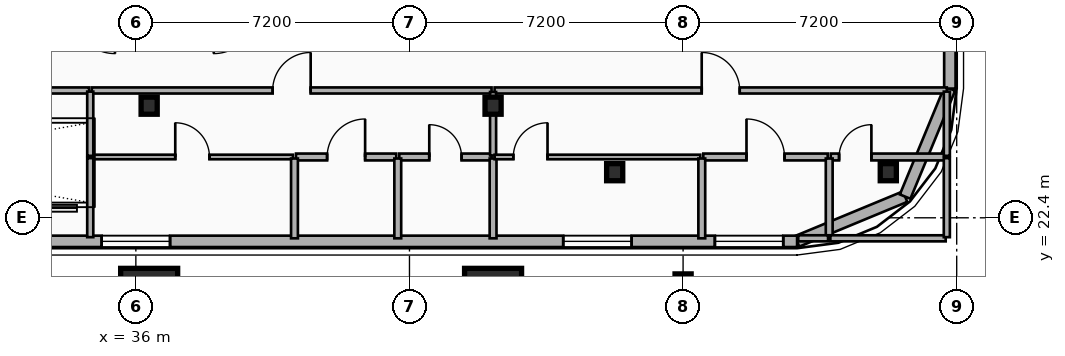
"""IFC4 building model, lengths in metres.
Left out: names, types, materials, properties, quantities, classifications, styles, units other than length and angle.
Written with IfcOpenShell. Run it as: python <this file> out.ifc"""

import sys

from ifc_helpers import new_model, si_unit, direction, frame, frame_2d, origin, origin_2d, place, context, subcontext, project, spatial, rectangle, i_section, extrude, element, fill, save


model = new_model("IFC4")
c1 = context("Model", 3, precision=1e-05, world=origin(), true_north=direction((0.0, 1.0)))
c2 = subcontext(c1, "Body", "Model", "MODEL_VIEW")
j1 = project(units=[si_unit("LENGTHUNIT", "METRE"), si_unit("PLANEANGLEUNIT", "RADIAN")], contexts=[c1])
p1 = place(None, origin())
s1 = spatial("IfcSite", under=j1, at=p1, CompositionType="ELEMENT")
p2 = place(p1, origin())
s2 = spatial("IfcBuilding", under=s1, at=p2, CompositionType="ELEMENT")
p3 = place(p2, frame((0.0, 0.0, 64.0)))
s3 = spatial("IfcBuildingStorey", under=s2, at=p3, CompositionType="ELEMENT", Elevation=64.0)
for number, where, z_axis, x_axis in (
    (1, (36.35, 25.35, 0.0), (0.0, 0.0, 1.0), (1.0, 0.0, 0.0)),
    (2, (45.4, 25.35, 0.0), (0.0, 0.0, 1.0), (1.0, 0.0, 0.0)),
):
    element("IfcColumn", number, at=place(p3, frame(where, z_axis=z_axis, x_axis=x_axis)), inside=s3, PredefinedType="COLUMN", context=c2, shape_type="SweptSolid", body=[
        extrude(i_section(OverallWidth=0.424, OverallDepth=0.45, WebThickness=0.041, FlangeThickness=0.065, FilletRadius=0.015, at=origin_2d()), origin(), (0.0, 0.0, 1.0), 3.5),
    ])
for number, where, z_axis, x_axis in (
    (3, (36.35, 20.428, 0.0), (0.0, -0.09, 0.996), (1.0, 0.0, 0.0)),
    (4, (45.4, 20.428, 0.0), (0.0, -0.09, 0.996), (1.0, 0.0, 0.0)),
):
    element("IfcColumn", number, at=place(p3, frame(where, z_axis=z_axis, x_axis=x_axis)), inside=s3, PredefinedType="COLUMN", context=c2, shape_type="SweptSolid", body=[
        extrude(rectangle(XDim=1.5, YDim=1.5, at=origin_2d()), origin(), (0.0, 0.0, 1.0), 3.514),
    ])
p4 = place(p3, frame((48.6, 23.6, 0.0), z_axis=(0.0, 0.0, 1.0), x_axis=(1.0, 0.0, 0.0)))
e5 = element("IfcColumn", 5, at=p4, inside=s3, PredefinedType="COLUMN", context=c2, shape_type="SweptSolid", body=[
    extrude(i_section(OverallWidth=0.424, OverallDepth=0.45, WebThickness=0.041, FlangeThickness=0.065, FilletRadius=0.015, at=origin_2d()), origin(), (0.0, 0.0, 1.0), 3.5),
])
p5 = place(p3, frame((50.4, 20.795, 0.0), z_axis=(0.0, -0.079891690793, 0.996803550226), x_axis=(1.0, 0.0, 0.0)))
e6 = element("IfcColumn", 6, at=p5, inside=s3, PredefinedType="COLUMN", context=c2, shape_type="SweptSolid", body=[
    extrude(i_section(OverallWidth=0.424, OverallDepth=0.45, WebThickness=0.041, FlangeThickness=0.065, FilletRadius=0.015, at=origin_2d()), origin(), (0.0, 0.0, 1.0), 3.511),
])
p6 = place(p3, frame((55.8, 23.6, 0.0), z_axis=(0.0, 0.0, 1.0), x_axis=(1.0, 0.0, 0.0)))
e7 = element("IfcColumn", 7, at=p6, inside=s3, PredefinedType="COLUMN", context=c2, shape_type="SweptSolid", body=[
    extrude(i_section(OverallWidth=0.424, OverallDepth=0.45, WebThickness=0.041, FlangeThickness=0.065, FilletRadius=0.015, at=origin_2d()), origin(), (0.0, 0.0, 1.0), 3.5),
])
p7 = place(p3, frame((56.243, 22.958, 0.0), z_axis=(0.0, 0.0, 1.0), x_axis=(-0.923882414032, -0.382676475685, 0.0)))
e8 = element("IfcWall", 8, at=p7, inside=s3, PredefinedType="SOLIDWALL", context=c2, shape_type="SweptSolid", body=[
    extrude(rectangle(XDim=3.077, YDim=0.3, at=frame_2d((1.539, 0.0))), origin(), (0.0, 0.0, 1.0), 3.24),
])
p8 = place(p3, frame((57.42, 25.8, 0.0), z_axis=(0.0, 0.0, 1.0), x_axis=(-0.382636798336, -0.92389884758, 0.0)))
e9 = element("IfcWall", 9, at=p8, inside=s3, PredefinedType="SOLIDWALL", context=c2, shape_type="SweptSolid", body=[
    extrude(rectangle(XDim=3.077, YDim=0.3, at=frame_2d((1.538, 0.0))), origin(), (0.0, 0.0, 1.0), 3.24),
])
p9 = place(p3, frame((57.42, 41.0, 0.0), z_axis=(0.0, 0.0, 1.0), x_axis=(0.0, -1.0, 0.0)))
e10 = element("IfcWall", 10, at=p9, inside=s3, PredefinedType="SOLIDWALL", context=c2, shape_type="SweptSolid", body=[
    extrude(rectangle(XDim=15.2, YDim=0.3, at=frame_2d((7.6, 0.0))), origin(), (0.0, 0.0, 1.0), 3.24),
])
p10 = place(p9, frame((8.781, 0.0, 0.48)))
e11 = element("IfcOpeningElement", 11, at=p10, cuts=e10, PredefinedType="OPENING", context=c2, shape_type="SweptSolid", body=[
    extrude(rectangle(XDim=1.4, YDim=1.8, at=frame_2d((0.7, 0.9))), frame((0.0, 0.16, 0.0), z_axis=(0.0, -1.0, 0.0), x_axis=(1.0, 0.0, 0.0)), (0.0, 0.0, 1.0), 0.32),
])
p11 = place(p9, frame((10.94, 0.0, 0.48)))
e12 = element("IfcOpeningElement", 12, at=p11, cuts=e10, PredefinedType="OPENING", context=c2, shape_type="SweptSolid", body=[
    extrude(rectangle(XDim=1.4, YDim=1.8, at=frame_2d((0.7, 0.9))), frame((0.0, 0.16, 0.0), z_axis=(0.0, -1.0, 0.0), x_axis=(1.0, 0.0, 0.0)), (0.0, 0.0, 1.0), 0.32),
])
p12 = place(p9, frame((3.807, 0.0, 0.48)))
e13 = element("IfcOpeningElement", 13, at=p12, cuts=e10, PredefinedType="OPENING", context=c2, shape_type="SweptSolid", body=[
    extrude(rectangle(XDim=1.4, YDim=1.8, at=frame_2d((0.7, 0.9))), frame((0.0, 0.16, 0.0), z_axis=(0.0, -1.0, 0.0), x_axis=(1.0, 0.0, 0.0)), (0.0, 0.0, 1.0), 0.32),
])
p13 = place(p9, frame((5.614, 0.0, 0.48)))
e14 = element("IfcOpeningElement", 14, at=p13, cuts=e10, PredefinedType="OPENING", context=c2, shape_type="SweptSolid", body=[
    extrude(rectangle(XDim=1.4, YDim=1.8, at=frame_2d((0.7, 0.9))), frame((0.0, 0.16, 0.0), z_axis=(0.0, -1.0, 0.0), x_axis=(1.0, 0.0, 0.0)), (0.0, 0.0, 1.0), 0.32),
])
p14 = place(p3, frame((53.4, 21.78, 0.0), z_axis=(0.0, 0.0, 1.0), x_axis=(-1.0, 0.0, 0.0)))
e15 = element("IfcWall", 15, at=p14, inside=s3, PredefinedType="SOLIDWALL", context=c2, shape_type="SweptSolid", body=[
    extrude(rectangle(XDim=49.2, YDim=0.3, at=frame_2d((24.6, 0.0))), origin(), (0.0, 0.0, 1.0), 2.72),
])
p15 = place(p14, frame((45.072, 0.0, 0.48)))
e16 = element("IfcOpeningElement", 16, at=p15, cuts=e15, PredefinedType="OPENING", context=c2, shape_type="SweptSolid", body=[
    extrude(rectangle(XDim=1.8, YDim=1.8, at=frame_2d((0.9, 0.9))), frame((0.0, 0.16, 0.0), z_axis=(0.0, -1.0, 0.0), x_axis=(1.0, 0.0, 0.0)), (0.0, 0.0, 1.0), 0.32),
])
p16 = place(p14, frame((39.5, 0.0, 0.34)))
e17 = element("IfcOpeningElement", 17, at=p16, cuts=e15, PredefinedType="OPENING", context=c2, shape_type="SweptSolid", body=[
    extrude(rectangle(XDim=1.4, YDim=1.8, at=frame_2d((0.7, 0.9))), frame((0.0, 0.16, 0.0), z_axis=(0.0, -1.0, 0.0), x_axis=(1.0, 0.0, 0.0)), (0.0, 0.0, 1.0), 0.32),
])
p17 = place(p14, frame((33.917, 0.0, 1.48)))
e18 = element("IfcOpeningElement", 18, at=p17, cuts=e15, PredefinedType="OPENING", context=c2, shape_type="SweptSolid", body=[
    extrude(rectangle(XDim=1.1, YDim=1.05, at=frame_2d((0.55, 0.525))), frame((0.0, 0.16, 0.0), z_axis=(0.0, -1.0, 0.0), x_axis=(1.0, 0.0, 0.0)), (0.0, 0.0, 1.0), 0.32),
])
p18 = place(p14, frame((16.5, 0.0, 0.34)))
e19 = element("IfcOpeningElement", 19, at=p18, cuts=e15, PredefinedType="OPENING", context=c2, shape_type="SweptSolid", body=[
    extrude(rectangle(XDim=1.8, YDim=1.8, at=frame_2d((0.9, 0.9))), frame((0.0, 0.16, 0.0), z_axis=(0.0, -1.0, 0.0), x_axis=(1.0, 0.0, 0.0)), (0.0, 0.0, 1.0), 0.32),
])
p19 = place(p14, frame((4.354, 0.0, 0.74)))
e20 = element("IfcOpeningElement", 20, at=p19, cuts=e15, PredefinedType="OPENING", context=c2, shape_type="SweptSolid", body=[
    extrude(rectangle(XDim=1.8, YDim=1.8, at=frame_2d((0.9, 0.9))), frame((0.0, 0.16, 0.0), z_axis=(0.0, -1.0, 0.0), x_axis=(1.0, 0.0, 0.0)), (0.0, 0.0, 1.0), 0.32),
])
p20 = place(p14, frame((0.364, 0.0, 0.74)))
e21 = element("IfcOpeningElement", 21, at=p20, cuts=e15, PredefinedType="OPENING", context=c2, shape_type="SweptSolid", body=[
    extrude(rectangle(XDim=1.8, YDim=1.8, at=frame_2d((0.9, 0.9))), frame((0.0, 0.16, 0.0), z_axis=(0.0, -1.0, 0.0), x_axis=(1.0, 0.0, 0.0)), (0.0, 0.0, 1.0), 0.32),
])
p21 = place(p3, frame((34.84, 25.75, 0.0), z_axis=(0.0, 0.0, 1.0), x_axis=(1.0, 0.0, 0.0)))
e22 = element("IfcWall", 22, at=p21, inside=s3, PredefinedType="PARTITIONING", context=c2, shape_type="SweptSolid", body=[
    extrude(rectangle(XDim=10.52, YDim=0.16, at=frame_2d((5.26, 0.0))), origin(), (0.0, 0.0, 1.0), 2.31),
])
p22 = place(p21, frame((4.76, 0.0, 0.0)))
e23 = element("IfcOpeningElement", 23, at=p22, cuts=e22, PredefinedType="OPENING", context=c2, shape_type="SweptSolid", body=[
    extrude(rectangle(XDim=1.0, YDim=2.15, at=frame_2d((0.5, 1.075))), frame((0.0, 0.09, 0.0), z_axis=(0.0, -1.0, 0.0), x_axis=(1.0, 0.0, 0.0)), (0.0, 0.0, 1.0), 0.18),
])
p23 = place(p3, frame((45.44, 25.75, 0.0), z_axis=(0.0, 0.0, 1.0), x_axis=(1.0, 0.0, 0.0)))
e24 = element("IfcWall", 24, at=p23, inside=s3, PredefinedType="PARTITIONING", context=c2, shape_type="SweptSolid", body=[
    extrude(rectangle(XDim=11.9, YDim=0.16, at=frame_2d((5.95, 0.0))), origin(), (0.0, 0.0, 1.0), 2.31),
])
p24 = place(p23, frame((5.45, 0.0, 0.0)))
e25 = element("IfcOpeningElement", 25, at=p24, cuts=e24, PredefinedType="OPENING", context=c2, shape_type="SweptSolid", body=[
    extrude(rectangle(XDim=1.0, YDim=2.15, at=frame_2d((0.5, 1.075))), frame((0.0, 0.09, 0.0), z_axis=(0.0, -1.0, 0.0), x_axis=(1.0, 0.0, 0.0)), (0.0, 0.0, 1.0), 0.18),
])
p25 = place(p3, frame((34.84, 24.0, 0.0), z_axis=(0.0, 0.0, 1.0), x_axis=(1.0, 0.0, 0.0)))
e26 = element("IfcWall", 26, at=p25, inside=s3, PredefinedType="PARTITIONING", context=c2, shape_type="SweptSolid", body=[
    extrude(rectangle(XDim=5.294, YDim=0.12, at=frame_2d((2.647, 0.0))), origin(), (0.0, 0.0, 1.0), 2.31),
])
p26 = place(p25, frame((2.197, 0.0, 0.0)))
e27 = element("IfcOpeningElement", 27, at=p26, cuts=e26, PredefinedType="OPENING", context=c2, shape_type="SweptSolid", body=[
    extrude(rectangle(XDim=0.9, YDim=2.1, at=frame_2d((0.45, 1.05))), frame((0.0, 0.07, 0.0), z_axis=(0.0, -1.0, 0.0), x_axis=(1.0, 0.0, 0.0)), (0.0, 0.0, 1.0), 0.14),
])
p27 = place(p3, frame((40.214, 24.0, 0.0), z_axis=(0.0, 0.0, 1.0), x_axis=(1.0, 0.0, 0.0)))
e28 = element("IfcWall", 28, at=p27, inside=s3, PredefinedType="PLUMBINGWALL", context=c2, shape_type="SweptSolid", body=[
    extrude(rectangle(XDim=2.638, YDim=0.18, at=frame_2d((1.319, 0.0))), origin(), (0.0, 0.0, 1.0), 3.24),
])
p28 = place(p27, frame((0.819, 0.0, 0.0)))
e29 = element("IfcOpeningElement", 29, at=p28, cuts=e28, PredefinedType="OPENING", context=c2, shape_type="SweptSolid", body=[
    extrude(rectangle(XDim=1.0, YDim=2.15, at=frame_2d((0.5, 1.075))), frame((0.0, 0.1, 0.0), z_axis=(0.0, -1.0, 0.0), x_axis=(1.0, 0.0, 0.0)), (0.0, 0.0, 1.0), 0.2),
])
p29 = place(p3, frame((42.932, 24.0, 0.0), z_axis=(0.0, 0.0, 1.0), x_axis=(1.0, 0.0, 0.0)))
e30 = element("IfcWall", 30, at=p29, inside=s3, PredefinedType="PLUMBINGWALL", context=c2, shape_type="SweptSolid", body=[
    extrude(rectangle(XDim=2.428, YDim=0.18, at=frame_2d((1.214, 0.0))), origin(), (0.0, 0.0, 1.0), 2.31),
])
p30 = place(p29, frame((0.789, 0.0, 0.0)))
e31 = element("IfcOpeningElement", 31, at=p30, cuts=e30, PredefinedType="OPENING", context=c2, shape_type="SweptSolid", body=[
    extrude(rectangle(XDim=0.85, YDim=2.1, at=frame_2d((0.425, 1.05))), frame((0.0, 0.1, 0.0), z_axis=(0.0, -1.0, 0.0), x_axis=(1.0, 0.0, 0.0)), (0.0, 0.0, 1.0), 0.2),
])
p31 = place(p3, frame((45.4, 24.04, 0.0), z_axis=(0.0, 0.0, 1.0), x_axis=(0.0, 1.0, 0.0)))
e32 = element("IfcWall", 32, at=p31, inside=s3, PredefinedType="PARTITIONING", context=c2, shape_type="SweptSolid", body=[
    extrude(rectangle(XDim=1.67, YDim=0.16, at=frame_2d((0.835, 0.0))), origin(), (0.0, 0.0, 1.0), 2.31),
])
for number, where, z_axis, x_axis in (
    (33, (40.174, 21.86, 0.0), (0.0, 0.0, 1.0), (0.0, 1.0, 0.0)),
    (34, (42.892, 21.86, 0.0), (0.0, 0.0, 1.0), (0.0, 1.0, 0.0)),
):
    element("IfcWall", number, at=place(p3, frame(where, z_axis=z_axis, x_axis=x_axis)), inside=s3, PredefinedType="PLUMBINGWALL", context=c2, shape_type="SweptSolid", body=[
        extrude(rectangle(XDim=2.1, YDim=0.18, at=frame_2d((1.05, 0.0))), origin(), (0.0, 0.0, 1.0), 2.82),
    ])
p32 = place(p3, frame((45.4, 21.86, 0.0), z_axis=(0.0, 0.0, 1.0), x_axis=(0.0, 1.0, 0.0)))
e35 = element("IfcWall", 35, at=p32, inside=s3, PredefinedType="PLUMBINGWALL", context=c2, shape_type="SweptSolid", body=[
    extrude(rectangle(XDim=2.1, YDim=0.18, at=frame_2d((1.05, 0.0))), origin(), (0.0, 0.0, 1.0), 2.31),
])
p33 = place(p3, frame((45.44, 24.0, 0.0), z_axis=(0.0, 0.0, 1.0), x_axis=(1.0, 0.0, 0.0)))
e36 = element("IfcWall", 36, at=p33, inside=s3, PredefinedType="PARTITIONING", context=c2, shape_type="SweptSolid", body=[
    extrude(rectangle(XDim=5.412, YDim=0.12, at=frame_2d((2.706, 0.0))), origin(), (0.0, 0.0, 1.0), 2.31),
])
p34 = place(p33, frame((0.493, 0.0, 0.0)))
e37 = element("IfcOpeningElement", 37, at=p34, cuts=e36, PredefinedType="OPENING", context=c2, shape_type="SweptSolid", body=[
    extrude(rectangle(XDim=0.9, YDim=2.1, at=frame_2d((0.45, 1.05))), frame((0.0, 0.07, 0.0), z_axis=(0.0, -1.0, 0.0), x_axis=(1.0, 0.0, 0.0)), (0.0, 0.0, 1.0), 0.14),
])
p35 = place(p3, frame((50.932, 24.0, 0.0), z_axis=(0.0, 0.0, 1.0), x_axis=(1.0, 0.0, 0.0)))
e38 = element("IfcWall", 38, at=p35, inside=s3, PredefinedType="PLUMBINGWALL", context=c2, shape_type="SweptSolid", body=[
    extrude(rectangle(XDim=3.273, YDim=0.18, at=frame_2d((1.637, 0.0))), origin(), (0.0, 0.0, 1.0), 2.57),
])
p36 = place(p35, frame((1.136, 0.0, 0.0)))
e39 = element("IfcOpeningElement", 39, at=p36, cuts=e38, PredefinedType="OPENING", context=c2, shape_type="SweptSolid", body=[
    extrude(rectangle(XDim=1.0, YDim=2.15, at=frame_2d((0.5, 1.075))), frame((0.0, 0.1, 0.0), z_axis=(0.0, -1.0, 0.0), x_axis=(1.0, 0.0, 0.0)), (0.0, 0.0, 1.0), 0.2),
])
p37 = place(p3, frame((54.285, 24.0, 0.0), z_axis=(0.0, 0.0, 1.0), x_axis=(1.0, 0.0, 0.0)))
e40 = element("IfcWall", 40, at=p37, inside=s3, PredefinedType="PLUMBINGWALL", context=c2, shape_type="SweptSolid", body=[
    extrude(rectangle(XDim=3.055, YDim=0.18, at=frame_2d((1.528, 0.0))), origin(), (0.0, 0.0, 1.0), 2.57),
])
p38 = place(p37, frame((0.22, 0.0, 0.0)))
e41 = element("IfcOpeningElement", 41, at=p38, cuts=e40, PredefinedType="OPENING", context=c2, shape_type="SweptSolid", body=[
    extrude(rectangle(XDim=0.85, YDim=2.1, at=frame_2d((0.425, 1.05))), frame((0.0, 0.1, 0.0), z_axis=(0.0, -1.0, 0.0), x_axis=(1.0, 0.0, 0.0)), (0.0, 0.0, 1.0), 0.2),
])
p39 = place(p3, frame((50.892, 21.86, 0.0), z_axis=(0.0, 0.0, 1.0), x_axis=(0.0, 1.0, 0.0)))
e42 = element("IfcWall", 42, at=p39, inside=s3, PredefinedType="PLUMBINGWALL", context=c2, shape_type="SweptSolid", body=[
    extrude(rectangle(XDim=2.1, YDim=0.18, at=frame_2d((1.05, 0.0))), origin(), (0.0, 0.0, 1.0), 2.57),
])
p40 = place(p3, frame((54.245, 21.86, 0.0), z_axis=(0.0, 0.0, 1.0), x_axis=(0.0, 1.0, 0.0)))
e43 = element("IfcWall", 43, at=p40, inside=s3, PredefinedType="PLUMBINGWALL", context=c2, shape_type="SweptSolid", body=[
    extrude(rectangle(XDim=2.1, YDim=0.18, at=frame_2d((1.05, 0.0))), origin(), (0.0, 0.0, 1.0), 2.72),
])
p41 = place(p3, frame((22.83, 25.75, 0.0), z_axis=(0.0, 0.0, 1.0), x_axis=(1.0, 0.0, 0.0)))
e44 = element("IfcWall", 44, at=p41, inside=s3, PredefinedType="PARTITIONING", context=c2, shape_type="SweptSolid", body=[
    extrude(rectangle(XDim=11.94, YDim=0.16, at=frame_2d((5.97, 0.0))), origin(), (0.0, 0.0, 1.0), 3.24),
])
p42 = place(p3, frame((34.8, 24.03, 0.0), z_axis=(0.0, 0.0, 1.0), x_axis=(0.0, 1.0, 0.0)))
e45 = element("IfcWall", 45, at=p42, inside=s3, PredefinedType="PARTITIONING", context=c2, shape_type="SweptSolid", body=[
    extrude(rectangle(XDim=1.69, YDim=0.16, at=frame_2d((0.845, 0.0))), origin(), (0.0, 0.0, 1.0), 3.24),
])
p43 = place(p3, frame((34.8, 21.89, 0.0), z_axis=(0.0, 0.0, 1.0), x_axis=(0.0, 1.0, 0.0)))
e46 = element("IfcWall", 46, at=p43, inside=s3, PredefinedType="PARTITIONING", context=c2, shape_type="SweptSolid", body=[
    extrude(rectangle(XDim=2.08, YDim=0.16, at=frame_2d((1.04, 0.0))), origin(), (0.0, 0.0, 1.0), 2.68),
])
p44 = place(p3, frame((57.34, 24.03, 0.0), z_axis=(0.0, 0.0, 1.0), x_axis=(0.0, 1.0, 0.0)))
e47 = element("IfcWall", 47, at=p44, inside=s3, PredefinedType="PARTITIONING", context=c2, shape_type="SweptSolid", body=[
    extrude(rectangle(XDim=1.69, YDim=0.16, at=frame_2d((0.845, 0.0))), origin(), (0.0, 0.0, 1.0), 3.24),
])
p45 = place(p3, frame((53.43, 21.86, 0.0), z_axis=(0.0, 0.0, 1.0), x_axis=(1.0, 0.0, 0.0)))
e48 = element("IfcWall", 48, at=p45, inside=s3, PredefinedType="PARTITIONING", context=c2, shape_type="SweptSolid", body=[
    extrude(rectangle(XDim=0.785, YDim=0.16, at=frame_2d((0.393, 0.0))), origin(), (0.0, 0.0, 1.0), 2.72),
])
p46 = place(p3, frame((54.275, 21.86, 0.0), z_axis=(0.0, 0.0, 1.0), x_axis=(1.0, 0.0, 0.0)))
e49 = element("IfcWall", 49, at=p46, inside=s3, PredefinedType="PARTITIONING", context=c2, shape_type="SweptSolid", body=[
    extrude(rectangle(XDim=3.035, YDim=0.16, at=frame_2d((1.518, 0.0))), origin(), (0.0, 0.0, 1.0), 2.72),
])
p47 = place(p3, frame((57.34, 21.89, 0.0), z_axis=(0.0, 0.0, 1.0), x_axis=(0.0, 1.0, 0.0)))
e50 = element("IfcWall", 50, at=p47, inside=s3, PredefinedType="PARTITIONING", context=c2, shape_type="SweptSolid", body=[
    extrude(rectangle(XDim=2.08, YDim=0.16, at=frame_2d((1.04, 0.0))), origin(), (0.0, 0.0, 1.0), 3.24),
])
p48 = place(p18, origin())
e51 = element("IfcWindow", 51, at=p48, inside=s3, PartitioningType="SINGLE_PANEL", PredefinedType="WINDOW", context=c2, shape_type="SweptSolid", body=[
    extrude(rectangle(XDim=1.8, YDim=1.8, at=frame_2d((0.9, 0.9))), frame((0.0, 0.03, 0.0), z_axis=(0.0, -1.0, 0.0), x_axis=(1.0, 0.0, 0.0)), (0.0, 0.0, 1.0), 0.06),
])
fill(e19, e51)
p49 = place(p19, origin())
e52 = element("IfcWindow", 52, at=p49, inside=s3, PartitioningType="SINGLE_PANEL", PredefinedType="WINDOW", context=c2, shape_type="SweptSolid", body=[
    extrude(rectangle(XDim=1.8, YDim=1.8, at=frame_2d((0.9, 0.9))), frame((0.0, 0.03, 0.0), z_axis=(0.0, -1.0, 0.0), x_axis=(1.0, 0.0, 0.0)), (0.0, 0.0, 1.0), 0.06),
])
fill(e20, e52)
p50 = place(p20, origin())
e53 = element("IfcWindow", 53, at=p50, inside=s3, PartitioningType="SINGLE_PANEL", PredefinedType="WINDOW", context=c2, shape_type="SweptSolid", body=[
    extrude(rectangle(XDim=1.8, YDim=1.8, at=frame_2d((0.9, 0.9))), frame((0.0, 0.03, 0.0), z_axis=(0.0, -1.0, 0.0), x_axis=(1.0, 0.0, 0.0)), (0.0, 0.0, 1.0), 0.06),
])
fill(e21, e53)
p51 = place(p22, origin())
e54 = element("IfcDoor", 54, at=p51, inside=s3, OperationType="SINGLE_SWING_RIGHT", PredefinedType="DOOR", context=c2, shape_type="SweptSolid", body=[
    extrude(rectangle(XDim=1.0, YDim=2.15, at=frame_2d((0.5, 1.075))), frame((0.0, 0.025, 0.0), z_axis=(0.0, -1.0, 0.0), x_axis=(1.0, 0.0, 0.0)), (0.0, 0.0, 1.0), 0.05),
])
fill(e23, e54)
p52 = place(p24, origin())
e55 = element("IfcDoor", 55, at=p52, inside=s3, OperationType="SINGLE_SWING_LEFT", PredefinedType="DOOR", context=c2, shape_type="SweptSolid", body=[
    extrude(rectangle(XDim=1.0, YDim=2.15, at=frame_2d((0.5, 1.075))), frame((0.0, 0.025, 0.0), z_axis=(0.0, -1.0, 0.0), x_axis=(1.0, 0.0, 0.0)), (0.0, 0.0, 1.0), 0.05),
])
fill(e25, e55)
p53 = place(p26, origin())
e56 = element("IfcDoor", 56, at=p53, inside=s3, OperationType="SINGLE_SWING_LEFT", PredefinedType="DOOR", context=c2, shape_type="SweptSolid", body=[
    extrude(rectangle(XDim=0.9, YDim=2.1, at=frame_2d((0.45, 1.05))), frame((0.0, 0.025, 0.0), z_axis=(0.0, -1.0, 0.0), x_axis=(1.0, 0.0, 0.0)), (0.0, 0.0, 1.0), 0.05),
])
fill(e27, e56)
p54 = place(p28, origin())
e57 = element("IfcDoor", 57, at=p54, inside=s3, OperationType="SINGLE_SWING_RIGHT", PredefinedType="DOOR", context=c2, shape_type="SweptSolid", body=[
    extrude(rectangle(XDim=1.0, YDim=2.15, at=frame_2d((0.5, 1.075))), frame((0.0, 0.025, 0.0), z_axis=(0.0, -1.0, 0.0), x_axis=(1.0, 0.0, 0.0)), (0.0, 0.0, 1.0), 0.05),
])
fill(e29, e57)
p55 = place(p30, origin())
e58 = element("IfcDoor", 58, at=p55, inside=s3, OperationType="SINGLE_SWING_LEFT", PredefinedType="DOOR", context=c2, shape_type="SweptSolid", body=[
    extrude(rectangle(XDim=0.85, YDim=2.1, at=frame_2d((0.425, 1.05))), frame((0.0, 0.025, 0.0), z_axis=(0.0, -1.0, 0.0), x_axis=(1.0, 0.0, 0.0)), (0.0, 0.0, 1.0), 0.05),
])
fill(e31, e58)
p56 = place(p34, origin())
e59 = element("IfcDoor", 59, at=p56, inside=s3, OperationType="SINGLE_SWING_RIGHT", PredefinedType="DOOR", context=c2, shape_type="SweptSolid", body=[
    extrude(rectangle(XDim=0.9, YDim=2.1, at=frame_2d((0.45, 1.05))), frame((0.0, 0.025, 0.0), z_axis=(0.0, -1.0, 0.0), x_axis=(1.0, 0.0, 0.0)), (0.0, 0.0, 1.0), 0.05),
])
fill(e37, e59)
p57 = place(p36, origin())
e60 = element("IfcDoor", 60, at=p57, inside=s3, OperationType="SINGLE_SWING_LEFT", PredefinedType="DOOR", context=c2, shape_type="SweptSolid", body=[
    extrude(rectangle(XDim=1.0, YDim=2.15, at=frame_2d((0.5, 1.075))), frame((0.0, 0.025, 0.0), z_axis=(0.0, -1.0, 0.0), x_axis=(1.0, 0.0, 0.0)), (0.0, 0.0, 1.0), 0.05),
])
fill(e39, e60)
p58 = place(p38, origin())
e61 = element("IfcDoor", 61, at=p58, inside=s3, OperationType="SINGLE_SWING_RIGHT", PredefinedType="DOOR", context=c2, shape_type="SweptSolid", body=[
    extrude(rectangle(XDim=0.85, YDim=2.1, at=frame_2d((0.425, 1.05))), frame((0.0, 0.025, 0.0), z_axis=(0.0, -1.0, 0.0), x_axis=(1.0, 0.0, 0.0)), (0.0, 0.0, 1.0), 0.05),
])
fill(e41, e61)
save(model, sys.argv[1])
